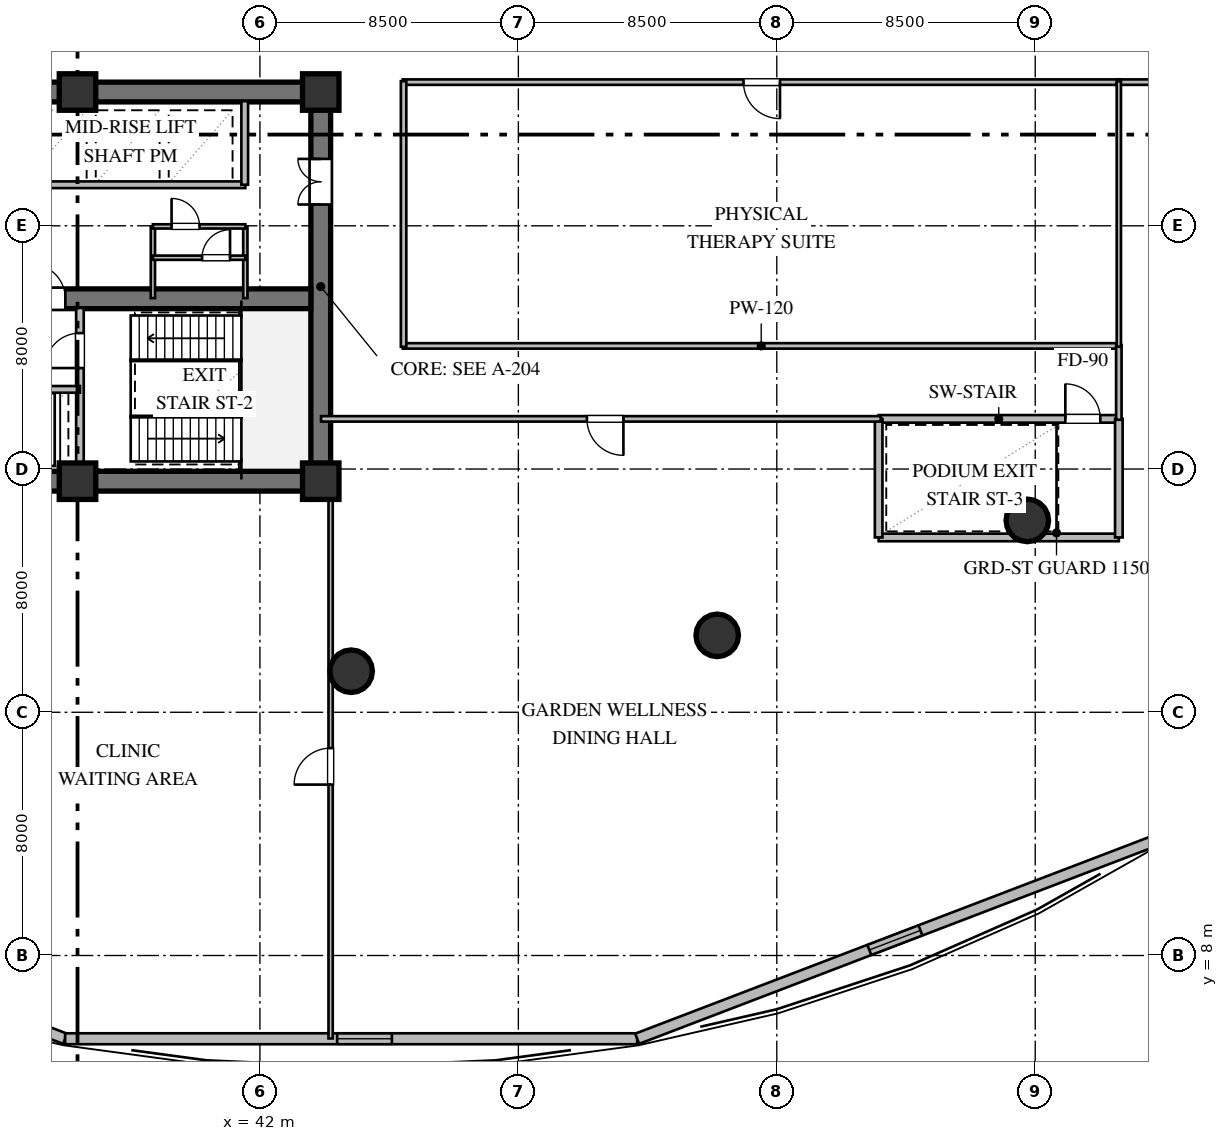
"""IFC4 building model, lengths in metres.
Left out: names, types, materials, properties, quantities, classifications, styles, units other than length and angle.
Written with IfcOpenShell. Run it as: python <this file> out.ifc"""

import sys

from ifc_helpers import new_model, si_unit, direction, frame, frame_2d, origin, origin_2d, place, context, subcontext, project, spatial, rectangle, circle, extrude, element, fill, save


model = new_model("IFC4")
c1 = context("Model", 3, precision=1e-05, world=origin(), true_north=direction((0.0, 1.0)))
c2 = subcontext(c1, "Body", "Model", "MODEL_VIEW")
j1 = project(units=[si_unit("LENGTHUNIT", "METRE"), si_unit("PLANEANGLEUNIT", "RADIAN")], contexts=[c1])
p1 = place(None, origin())
s1 = spatial("IfcSite", under=j1, at=p1, CompositionType="ELEMENT")
p2 = place(p1, origin())
s2 = spatial("IfcBuilding", under=s1, at=p2, CompositionType="ELEMENT")
p3 = place(p2, frame((0.0, 0.0, 19.2)))
s3 = spatial("IfcBuildingStorey", under=s2, at=p3, CompositionType="ELEMENT", Elevation=19.2)
for number, where, z_axis, x_axis in (
    (1, (21.675, 23.6, 0.0), (0.0, 0.0, 1.0), (1.0, 0.0, 0.0)),
    (2, (21.675, 36.4, 0.0), (0.0, 0.0, 1.0), (1.0, 0.0, 0.0)),
):
    element("IfcWall", number, at=place(p3, frame(where, z_axis=z_axis, x_axis=x_axis)), inside=s3, PredefinedType="SHEAR", context=c2, shape_type="SweptSolid", body=[
        extrude(rectangle(XDim=22.65, YDim=0.65, at=frame_2d((11.325, 0.0))), origin(), (0.0, 0.0, 1.0), 4.56),
    ])
p4 = place(p3, frame((44.0, 23.925, 0.0), z_axis=(0.0, 0.0, 1.0), x_axis=(0.0, 1.0, 0.0)))
e3 = element("IfcWall", 3, at=p4, inside=s3, PredefinedType="SHEAR", context=c2, shape_type="SweptSolid", body=[
    extrude(rectangle(XDim=12.15, YDim=0.65, at=frame_2d((6.075, 0.0))), origin(), (0.0, 0.0, 1.0), 4.56),
])
p5 = place(p4, frame((8.775, 0.0, 0.0)))
e4 = element("IfcOpeningElement", 4, at=p5, cuts=e3, PredefinedType="OPENING", context=c2, shape_type="SweptSolid", body=[
    extrude(rectangle(XDim=1.5, YDim=2.15, at=frame_2d((0.75, 1.075))), frame((0.0, 0.335, 0.0), z_axis=(0.0, -1.0, 0.0), x_axis=(1.0, 0.0, 0.0)), (0.0, 0.0, 1.0), 0.67),
])
p6 = place(p3, frame((22.325, 29.6, 0.0), z_axis=(0.0, 0.0, 1.0), x_axis=(1.0, 0.0, 0.0)))
e5 = element("IfcWall", 5, at=p6, inside=s3, PredefinedType="SHEAR", context=c2, shape_type="SweptSolid", body=[
    extrude(rectangle(XDim=21.35, YDim=0.65, at=frame_2d((10.675, 0.0))), origin(), (0.0, 0.0, 1.0), 4.56),
])
p7 = place(p6, frame((12.125, 0.0, 0.0)))
e6 = element("IfcOpeningElement", 6, at=p7, cuts=e5, PredefinedType="OPENING", context=c2, shape_type="SweptSolid", body=[
    extrude(rectangle(XDim=1.15, YDim=2.1, at=frame_2d((0.575, 1.05))), frame((0.0, 0.335, 0.0), z_axis=(0.0, -1.0, 0.0), x_axis=(1.0, 0.0, 0.0)), (0.0, 0.0, 1.0), 0.67),
])
for number, where, z_axis, x_axis in (
    (7, (36.0, 23.6, 0.0), (0.0, 0.0, 1.0), (1.0, 0.0, 0.0)),
    (8, (44.0, 23.6, 0.0), (0.0, 0.0, 1.0), (1.0, 0.0, 0.0)),
    (9, (44.0, 36.4, 0.0), (0.0, 0.0, 1.0), (1.0, 0.0, 0.0)),
    (10, (36.0, 36.4, 0.0), (0.0, 0.0, 1.0), (1.0, 0.0, 0.0)),
):
    element("IfcColumn", number, at=place(p3, frame(where, z_axis=z_axis, x_axis=x_axis)), inside=s3, PredefinedType="COLUMN", context=c2, shape_type="SweptSolid", body=[
        extrude(rectangle(XDim=1.2, YDim=1.2, at=origin_2d()), origin(), (0.0, 0.0, 1.0), 4.8),
    ])
for number, where, z_axis, x_axis in (
    (11, (45.0, 17.35, 0.0), (0.0, 0.0, 1.0), (1.0, 0.0, 0.0)),
    (12, (57.04, 18.53, 0.0), (0.0, 0.0, 1.0), (1.0, 0.0, 0.0)),
    (13, (67.24, 22.31, 0.0), (0.0, 0.0, 1.0), (1.0, 0.0, 0.0)),
):
    element("IfcColumn", number, at=place(p3, frame(where, z_axis=z_axis, x_axis=x_axis)), inside=s3, PredefinedType="COLUMN", context=c2, shape_type="SweptSolid", body=[
        extrude(circle(Radius=0.7, at=origin_2d()), origin(), (0.0, 0.0, 1.0), 4.8),
    ])
p8 = place(p3, frame((18.396, 11.839, 0.0), z_axis=(0.0, 0.0, 1.0), x_axis=(0.934012147289, -0.357241247221, 0.0)))
e14 = element("IfcWall", 14, at=p8, inside=s3, PredefinedType="STANDARD", context=c2, shape_type="SweptSolid", body=[
    extrude(rectangle(XDim=18.411, YDim=0.36, at=frame_2d((9.206, 0.0))), origin(), (0.0, 0.0, 1.0), 4.56),
])
p9 = place(p8, frame((8.305, 0.0, 1.05)))
e15 = element("IfcOpeningElement", 15, at=p9, cuts=e14, PredefinedType="OPENING", context=c2, shape_type="SweptSolid", body=[
    extrude(rectangle(XDim=1.8, YDim=1.7, at=frame_2d((0.9, 0.85))), frame((0.0, 0.19, 0.0), z_axis=(0.0, -1.0, 0.0), x_axis=(1.0, 0.0, 0.0)), (0.0, 0.0, 1.0), 0.38),
])
p10 = place(p3, frame((35.592, 5.262, 0.0), z_axis=(0.0, 0.0, 1.0), x_axis=(1.0, 0.0, 0.0)))
e16 = element("IfcWall", 16, at=p10, inside=s3, PredefinedType="STANDARD", context=c2, shape_type="SweptSolid", body=[
    extrude(rectangle(XDim=18.816, YDim=0.36, at=frame_2d((9.408, 0.0))), origin(), (0.0, 0.0, 1.0), 4.56),
])
p11 = place(p10, frame((8.948, 0.0, 1.05)))
e17 = element("IfcOpeningElement", 17, at=p11, cuts=e16, PredefinedType="OPENING", context=c2, shape_type="SweptSolid", body=[
    extrude(rectangle(XDim=1.8, YDim=1.7, at=frame_2d((0.9, 0.85))), frame((0.0, 0.19, 0.0), z_axis=(0.0, -1.0, 0.0), x_axis=(1.0, 0.0, 0.0)), (0.0, 0.0, 1.0), 0.38),
])
p12 = place(p3, frame((54.408, 5.262, 0.0), z_axis=(0.0, 0.0, 1.0), x_axis=(0.934014086565, 0.357236176917, 0.0)))
e18 = element("IfcWall", 18, at=p12, inside=s3, PredefinedType="STANDARD", context=c2, shape_type="SweptSolid", body=[
    extrude(rectangle(XDim=18.151, YDim=0.36, at=frame_2d((9.075, 0.0))), origin(), (0.0, 0.0, 1.0), 4.56),
])
p13 = place(p12, frame((8.175, 0.0, 1.05)))
e19 = element("IfcOpeningElement", 19, at=p13, cuts=e18, PredefinedType="OPENING", context=c2, shape_type="SweptSolid", body=[
    extrude(rectangle(XDim=1.8, YDim=1.7, at=frame_2d((0.9, 0.85))), frame((0.0, 0.19, 0.0), z_axis=(0.0, -1.0, 0.0), x_axis=(1.0, 0.0, 0.0)), (0.0, 0.0, 1.0), 0.38),
])
p14 = place(p3, frame((36.08, 23.9, 0.0), z_axis=(0.0, 0.0, 1.0), x_axis=(0.0, 1.0, 0.0)))
e20 = element("IfcWall", 20, at=p14, inside=s3, PredefinedType="SOLIDWALL", context=c2, shape_type="SweptSolid", body=[
    extrude(rectangle(XDim=5.4, YDim=0.25, at=frame_2d((2.7, 0.0))), origin(), (0.0, 0.0, 1.0), 4.56),
])
p15 = place(p14, frame((3.421, 0.0, 0.0)))
e21 = element("IfcOpeningElement", 21, at=p15, cuts=e20, PredefinedType="OPENING", context=c2, shape_type="SweptSolid", body=[
    extrude(rectangle(XDim=1.15, YDim=2.1, at=frame_2d((0.575, 1.05))), frame((0.0, 0.135, 0.0), z_axis=(0.0, -1.0, 0.0), x_axis=(1.0, 0.0, 0.0)), (0.0, 0.0, 1.0), 0.27),
])
p16 = place(p3, frame((29.92, 26.62, 0.0), z_axis=(0.0, 0.0, 1.0), x_axis=(1.0, 0.0, 0.0)))
e22 = element("IfcWall", 22, at=p16, inside=s3, PredefinedType="SOLIDWALL", context=c2, shape_type="SweptSolid", body=[
    extrude(rectangle(XDim=6.16, YDim=0.22, at=frame_2d((3.08, 0.0))), origin(), (0.0, 0.0, 1.0), 4.56),
])
p17 = place(p16, frame((0.99, 0.0, 0.0)))
e23 = element("IfcOpeningElement", 23, at=p17, cuts=e22, PredefinedType="OPENING", context=c2, shape_type="SweptSolid", body=[
    extrude(rectangle(XDim=1.1, YDim=2.1, at=frame_2d((0.55, 1.05))), frame((0.0, 0.12, 0.0), z_axis=(0.0, -1.0, 0.0), x_axis=(1.0, 0.0, 0.0)), (0.0, 0.0, 1.0), 0.24),
])
p18 = place(p16, frame((4.07, 0.0, 0.0)))
e24 = element("IfcOpeningElement", 24, at=p18, cuts=e22, PredefinedType="OPENING", context=c2, shape_type="SweptSolid", body=[
    extrude(rectangle(XDim=1.1, YDim=2.1, at=frame_2d((0.55, 1.05))), frame((0.0, 0.12, 0.0), z_axis=(0.0, -1.0, 0.0), x_axis=(1.0, 0.0, 0.0)), (0.0, 0.0, 1.0), 0.24),
])
p19 = place(p3, frame((33.98, 33.35, 0.0), z_axis=(0.0, 0.0, 1.0), x_axis=(1.0, 0.0, 0.0)))
e25 = element("IfcWall", 25, at=p19, inside=s3, PredefinedType="SOLIDWALL", context=c2, shape_type="SweptSolid", body=[
    extrude(rectangle(XDim=7.54, YDim=0.22, at=frame_2d((3.77, 0.0))), origin(), (0.0, 0.0, 1.0), 4.56),
])
p20 = place(p3, frame((41.5, 33.35, 0.0), z_axis=(0.0, 0.0, 1.0), x_axis=(0.0, 1.0, 0.0)))
e26 = element("IfcWall", 26, at=p20, inside=s3, PredefinedType="SOLIDWALL", context=c2, shape_type="SweptSolid", body=[
    extrude(rectangle(XDim=2.75, YDim=0.22, at=frame_2d((1.375, 0.0))), origin(), (0.0, 0.0, 1.0), 4.56),
])
p21 = place(p3, frame((38.48, 29.62, 0.0), z_axis=(0.0, 0.0, 1.0), x_axis=(0.0, 1.0, 0.0)))
e27 = element("IfcWall", 27, at=p21, inside=s3, PredefinedType="PARTITIONING", context=c2, shape_type="SweptSolid", body=[
    extrude(rectangle(XDim=2.36, YDim=0.14, at=frame_2d((1.18, 0.0))), origin(), (0.0, 0.0, 1.0), 4.56),
])
p22 = place(p3, frame((41.52, 29.62, 0.0), z_axis=(0.0, 0.0, 1.0), x_axis=(0.0, 1.0, 0.0)))
e28 = element("IfcWall", 28, at=p22, inside=s3, PredefinedType="PARTITIONING", context=c2, shape_type="SweptSolid", body=[
    extrude(rectangle(XDim=2.36, YDim=0.14, at=frame_2d((1.18, 0.0))), origin(), (0.0, 0.0, 1.0), 1.887),
])
p23 = place(p3, frame((38.48, 30.95, 0.0), z_axis=(0.0, 0.0, 1.0), x_axis=(1.0, 0.0, 0.0)))
e29 = element("IfcWall", 29, at=p23, inside=s3, PredefinedType="PARTITIONING", context=c2, shape_type="SweptSolid", body=[
    extrude(rectangle(XDim=3.04, YDim=0.14, at=frame_2d((1.52, 0.0))), origin(), (0.0, 0.0, 1.0), 4.56),
])
p24 = place(p23, frame((1.617, 0.0, 0.0)))
e30 = element("IfcOpeningElement", 30, at=p24, cuts=e29, PredefinedType="OPENING", context=c2, shape_type="SweptSolid", body=[
    extrude(rectangle(XDim=0.92, YDim=2.1, at=frame_2d((0.46, 1.05))), frame((0.0, 0.08, 0.0), z_axis=(0.0, -1.0, 0.0), x_axis=(1.0, 0.0, 0.0)), (0.0, 0.0, 1.0), 0.16),
])
p25 = place(p3, frame((38.48, 31.98, 0.0), z_axis=(0.0, 0.0, 1.0), x_axis=(1.0, 0.0, 0.0)))
e31 = element("IfcWall", 31, at=p25, inside=s3, PredefinedType="PARTITIONING", context=c2, shape_type="SweptSolid", body=[
    extrude(rectangle(XDim=3.04, YDim=0.14, at=frame_2d((1.52, 0.0))), origin(), (0.0, 0.0, 1.0), 4.56),
])
p26 = place(p25, frame((0.614, 0.0, 0.0)))
e32 = element("IfcOpeningElement", 32, at=p26, cuts=e31, PredefinedType="OPENING", context=c2, shape_type="SweptSolid", body=[
    extrude(rectangle(XDim=0.92, YDim=2.1, at=frame_2d((0.46, 1.05))), frame((0.0, 0.08, 0.0), z_axis=(0.0, -1.0, 0.0), x_axis=(1.0, 0.0, 0.0)), (0.0, 0.0, 1.0), 0.16),
])
p27 = place(p3, frame((62.35, 25.65, 0.0), z_axis=(0.0, 0.0, 1.0), x_axis=(1.0, 0.0, 0.0)))
e33 = element("IfcWall", 33, at=p27, inside=s3, PredefinedType="SOLIDWALL", context=c2, shape_type="SweptSolid", body=[
    extrude(rectangle(XDim=7.9, YDim=0.25, at=frame_2d((3.95, 0.0))), origin(), (0.0, 0.0, 1.0), 4.56),
])
p28 = place(p27, frame((6.14, 0.0, 0.0)))
e34 = element("IfcOpeningElement", 34, at=p28, cuts=e33, PredefinedType="OPENING", context=c2, shape_type="SweptSolid", body=[
    extrude(rectangle(XDim=1.15, YDim=2.1, at=frame_2d((0.575, 1.05))), frame((0.0, 0.135, 0.0), z_axis=(0.0, -1.0, 0.0), x_axis=(1.0, 0.0, 0.0)), (0.0, 0.0, 1.0), 0.27),
])
p29 = place(p3, frame((62.35, 21.75, 0.0), z_axis=(0.0, 0.0, 1.0), x_axis=(1.0, 0.0, 0.0)))
e35 = element("IfcWall", 35, at=p29, inside=s3, PredefinedType="SOLIDWALL", context=c2, shape_type="SweptSolid", body=[
    extrude(rectangle(XDim=7.9, YDim=0.25, at=frame_2d((3.95, 0.0))), origin(), (0.0, 0.0, 1.0), 4.006),
])
for number, where, z_axis, x_axis in (
    (36, (62.35, 21.75, 0.0), (0.0, 0.0, 1.0), (0.0, 1.0, 0.0)),
    (37, (70.25, 21.75, 0.0), (0.0, 0.0, 1.0), (0.0, 1.0, 0.0)),
):
    element("IfcWall", number, at=place(p3, frame(where, z_axis=z_axis, x_axis=x_axis)), inside=s3, PredefinedType="SOLIDWALL", context=c2, shape_type="SweptSolid", body=[
        extrude(rectangle(XDim=3.9, YDim=0.25, at=frame_2d((1.95, 0.0))), origin(), (0.0, 0.0, 1.0), 4.56),
    ])
p30 = place(p3, frame((62.415, 25.65, 0.0), z_axis=(0.0, 0.0, 1.0), x_axis=(-1.0, 0.0, 0.0)))
e38 = element("IfcWall", 38, at=p30, inside=s3, PredefinedType="PARTITIONING", context=c2, shape_type="SweptSolid", body=[
    extrude(rectangle(XDim=18.405, YDim=0.18, at=frame_2d((9.203, 0.0))), origin(), (0.0, 0.0, 1.0), 4.006),
])
p31 = place(p30, frame((8.46, 0.0, 0.0)))
e39 = element("IfcOpeningElement", 39, at=p31, cuts=e38, PredefinedType="OPENING", context=c2, shape_type="SweptSolid", body=[
    extrude(rectangle(XDim=1.2, YDim=2.15, at=frame_2d((0.6, 1.075))), frame((0.0, 0.1, 0.0), z_axis=(0.0, -1.0, 0.0), x_axis=(1.0, 0.0, 0.0)), (0.0, 0.0, 1.0), 0.2),
])
p32 = place(p3, frame((70.315, 36.725, 0.0), z_axis=(0.0, 0.0, 1.0), x_axis=(-1.0, 0.0, 0.0)))
e40 = element("IfcWall", 40, at=p32, inside=s3, PredefinedType="PARTITIONING", context=c2, shape_type="SweptSolid", body=[
    extrude(rectangle(XDim=23.62, YDim=0.18, at=frame_2d((11.81, 0.0))), origin(), (0.0, 0.0, 1.0), 4.006),
])
p33 = place(p32, frame((11.21, 0.0, 0.0)))
e41 = element("IfcOpeningElement", 41, at=p33, cuts=e40, PredefinedType="OPENING", context=c2, shape_type="SweptSolid", body=[
    extrude(rectangle(XDim=1.2, YDim=2.15, at=frame_2d((0.6, 1.075))), frame((0.0, 0.1, 0.0), z_axis=(0.0, -1.0, 0.0), x_axis=(1.0, 0.0, 0.0)), (0.0, 0.0, 1.0), 0.2),
])
p34 = place(p3, frame((46.695, 28.05, 0.0), z_axis=(0.0, 0.0, 1.0), x_axis=(1.0, 0.0, 0.0)))
e42 = element("IfcWall", 42, at=p34, inside=s3, PredefinedType="PARTITIONING", context=c2, shape_type="SweptSolid", body=[
    extrude(rectangle(XDim=23.585, YDim=0.18, at=frame_2d((11.792, 0.0))), origin(), (0.0, 0.0, 1.0), 4.006),
])
p35 = place(p3, frame((46.725, 36.755, 0.0), z_axis=(0.0, 0.0, 1.0), x_axis=(0.0, -1.0, 0.0)))
e43 = element("IfcWall", 43, at=p35, inside=s3, PredefinedType="PARTITIONING", context=c2, shape_type="SweptSolid", body=[
    extrude(rectangle(XDim=8.735, YDim=0.18, at=frame_2d((4.367, 0.0))), origin(), (0.0, 0.0, 1.0), 4.56),
])
p36 = place(p3, frame((78.03, 36.725, 0.0), z_axis=(0.0, 0.0, 1.0), x_axis=(-1.0, 0.0, 0.0)))
e44 = element("IfcWall", 44, at=p36, inside=s3, PredefinedType="PARTITIONING", context=c2, shape_type="SweptSolid", body=[
    extrude(rectangle(XDim=7.845, YDim=0.18, at=frame_2d((3.922, 0.0))), origin(), (0.0, 0.0, 1.0), 4.56),
])
p37 = place(p36, frame((3.322, 0.0, 0.0)))
e45 = element("IfcOpeningElement", 45, at=p37, cuts=e44, PredefinedType="OPENING", context=c2, shape_type="SweptSolid", body=[
    extrude(rectangle(XDim=1.2, YDim=2.15, at=frame_2d((0.6, 1.075))), frame((0.0, 0.1, 0.0), z_axis=(0.0, -1.0, 0.0), x_axis=(1.0, 0.0, 0.0)), (0.0, 0.0, 1.0), 0.2),
])
p38 = place(p3, frame((70.25, 28.08, 0.0), z_axis=(0.0, 0.0, 1.0), x_axis=(0.0, -1.0, 0.0)))
e46 = element("IfcWall", 46, at=p38, inside=s3, PredefinedType="PARTITIONING", context=c2, shape_type="SweptSolid", body=[
    extrude(rectangle(XDim=2.46, YDim=0.18, at=frame_2d((1.23, 0.0))), origin(), (0.0, 0.0, 1.0), 4.56),
])
p39 = place(p3, frame((44.325, 5.272, 0.0), z_axis=(0.0, 0.0, 1.0), x_axis=(0.0, 1.0, 0.0)))
e47 = element("IfcWall", 47, at=p39, inside=s3, PredefinedType="PARTITIONING", context=c2, shape_type="SweptSolid", body=[
    extrude(rectangle(XDim=18.318, YDim=0.14, at=frame_2d((9.159, 0.0))), origin(), (0.0, 0.0, 1.0), 3.7),
])
p40 = place(p39, frame((8.349, 0.0, 0.0)))
e48 = element("IfcOpeningElement", 48, at=p40, cuts=e47, PredefinedType="OPENING", context=c2, shape_type="SweptSolid", body=[
    extrude(rectangle(XDim=1.2, YDim=2.15, at=frame_2d((0.6, 1.075))), frame((0.0, 0.08, 0.0), z_axis=(0.0, -1.0, 0.0), x_axis=(1.0, 0.0, 0.0)), (0.0, 0.0, 1.0), 0.16),
])
p41 = place(p3, frame((70.25, 36.755, 0.0), z_axis=(0.0, 0.0, 1.0), x_axis=(0.0, -1.0, 0.0)))
e49 = element("IfcWall", 49, at=p41, inside=s3, PredefinedType="PARTITIONING", context=c2, shape_type="SweptSolid", body=[
    extrude(rectangle(XDim=8.735, YDim=0.14, at=frame_2d((4.367, 0.0))), origin(), (0.0, 0.0, 1.0), 4.56),
])
p42 = place(p11, origin())
e50 = element("IfcWindow", 50, at=p42, inside=s3, PartitioningType="SINGLE_PANEL", PredefinedType="WINDOW", context=c2, shape_type="SweptSolid", body=[
    extrude(rectangle(XDim=1.8, YDim=1.7, at=frame_2d((0.9, 0.85))), frame((0.0, 0.03, 0.0), z_axis=(0.0, -1.0, 0.0), x_axis=(1.0, 0.0, 0.0)), (0.0, 0.0, 1.0), 0.06),
])
fill(e17, e50)
p43 = place(p13, origin())
e51 = element("IfcWindow", 51, at=p43, inside=s3, PartitioningType="SINGLE_PANEL", PredefinedType="WINDOW", context=c2, shape_type="SweptSolid", body=[
    extrude(rectangle(XDim=1.8, YDim=1.7, at=frame_2d((0.9, 0.85))), frame((0.0, 0.03, 0.0), z_axis=(0.0, -1.0, 0.0), x_axis=(1.0, 0.0, 0.0)), (0.0, 0.0, 1.0), 0.06),
])
fill(e19, e51)
p44 = place(p15, origin())
e52 = element("IfcDoor", 52, at=p44, inside=s3, OperationType="SINGLE_SWING_LEFT", PredefinedType="DOOR", context=c2, shape_type="SweptSolid", body=[
    extrude(rectangle(XDim=1.15, YDim=2.1, at=frame_2d((0.575, 1.05))), frame((0.0, 0.025, 0.0), z_axis=(0.0, -1.0, 0.0), x_axis=(1.0, 0.0, 0.0)), (0.0, 0.0, 1.0), 0.05),
])
fill(e21, e52)
p45 = place(p7, origin())
e53 = element("IfcDoor", 53, at=p45, inside=s3, OperationType="SINGLE_SWING_LEFT", PredefinedType="DOOR", context=c2, shape_type="SweptSolid", body=[
    extrude(rectangle(XDim=1.15, YDim=2.1, at=frame_2d((0.575, 1.05))), frame((0.0, 0.025, 0.0), z_axis=(0.0, -1.0, 0.0), x_axis=(1.0, 0.0, 0.0)), (0.0, 0.0, 1.0), 0.05),
])
fill(e6, e53)
p46 = place(p5, origin())
e54 = element("IfcDoor", 54, at=p46, inside=s3, OperationType="DOUBLE_DOOR_SINGLE_SWING", PredefinedType="DOOR", context=c2, shape_type="SweptSolid", body=[
    extrude(rectangle(XDim=1.5, YDim=2.15, at=frame_2d((0.75, 1.075))), frame((0.0, 0.025, 0.0), z_axis=(0.0, -1.0, 0.0), x_axis=(1.0, 0.0, 0.0)), (0.0, 0.0, 1.0), 0.05),
])
fill(e4, e54)
p47 = place(p26, origin())
e55 = element("IfcDoor", 55, at=p47, inside=s3, OperationType="SINGLE_SWING_LEFT", PredefinedType="DOOR", context=c2, shape_type="SweptSolid", body=[
    extrude(rectangle(XDim=0.92, YDim=2.1, at=frame_2d((0.46, 1.05))), frame((0.0, 0.025, 0.0), z_axis=(0.0, -1.0, 0.0), x_axis=(1.0, 0.0, 0.0)), (0.0, 0.0, 1.0), 0.05),
])
fill(e32, e55)
p48 = place(p24, origin())
e56 = element("IfcDoor", 56, at=p48, inside=s3, OperationType="SINGLE_SWING_RIGHT", PredefinedType="DOOR", context=c2, shape_type="SweptSolid", body=[
    extrude(rectangle(XDim=0.92, YDim=2.1, at=frame_2d((0.46, 1.05))), frame((0.0, 0.025, 0.0), z_axis=(0.0, -1.0, 0.0), x_axis=(1.0, 0.0, 0.0)), (0.0, 0.0, 1.0), 0.05),
])
fill(e30, e56)
p49 = place(p28, origin())
e57 = element("IfcDoor", 57, at=p49, inside=s3, OperationType="SINGLE_SWING_LEFT", PredefinedType="DOOR", context=c2, shape_type="SweptSolid", body=[
    extrude(rectangle(XDim=1.15, YDim=2.1, at=frame_2d((0.575, 1.05))), frame((0.0, 0.025, 0.0), z_axis=(0.0, -1.0, 0.0), x_axis=(1.0, 0.0, 0.0)), (0.0, 0.0, 1.0), 0.05),
])
fill(e34, e57)
p50 = place(p31, origin())
e58 = element("IfcDoor", 58, at=p50, inside=s3, OperationType="SINGLE_SWING_LEFT", PredefinedType="DOOR", context=c2, shape_type="SweptSolid", body=[
    extrude(rectangle(XDim=1.2, YDim=2.15, at=frame_2d((0.6, 1.075))), frame((0.0, 0.025, 0.0), z_axis=(0.0, -1.0, 0.0), x_axis=(1.0, 0.0, 0.0)), (0.0, 0.0, 1.0), 0.05),
])
fill(e39, e58)
p51 = place(p33, origin())
e59 = element("IfcDoor", 59, at=p51, inside=s3, OperationType="SINGLE_SWING_LEFT", PredefinedType="DOOR", context=c2, shape_type="SweptSolid", body=[
    extrude(rectangle(XDim=1.2, YDim=2.15, at=frame_2d((0.6, 1.075))), frame((0.0, 0.025, 0.0), z_axis=(0.0, -1.0, 0.0), x_axis=(1.0, 0.0, 0.0)), (0.0, 0.0, 1.0), 0.05),
])
fill(e41, e59)
p52 = place(p40, origin())
e60 = element("IfcDoor", 60, at=p52, inside=s3, OperationType="SINGLE_SWING_LEFT", PredefinedType="DOOR", context=c2, shape_type="SweptSolid", body=[
    extrude(rectangle(XDim=1.2, YDim=2.15, at=frame_2d((0.6, 1.075))), frame((0.0, 0.025, 0.0), z_axis=(0.0, -1.0, 0.0), x_axis=(1.0, 0.0, 0.0)), (0.0, 0.0, 1.0), 0.05),
])
fill(e48, e60)
save(model, sys.argv[1])
